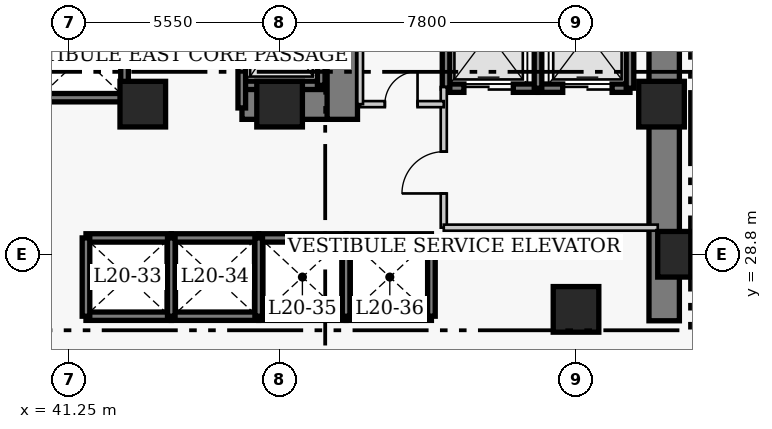
"""IFC4 building model, lengths in metres.
Left out: names, types, materials, properties, quantities, classifications, styles, units other than length and angle.
Written with IfcOpenShell. Run it as: python <this file> out.ifc"""

import sys

from ifc_helpers import new_model, si_unit, direction, frame, frame_2d, origin, origin_2d, place, context, subcontext, project, spatial, rectangle, extrude, element, fill, save


model = new_model("IFC4")
c1 = context("Model", 3, precision=1e-05, world=origin(), true_north=direction((0.0, 1.0)))
c2 = subcontext(c1, "Body", "Model", "MODEL_VIEW")
j1 = project(units=[si_unit("LENGTHUNIT", "METRE"), si_unit("PLANEANGLEUNIT", "RADIAN")], contexts=[c1])
p1 = place(None, origin())
s1 = spatial("IfcSite", under=j1, at=p1, CompositionType="ELEMENT")
p2 = place(p1, origin())
s2 = spatial("IfcBuilding", under=s1, at=p2, CompositionType="ELEMENT")
p3 = place(p2, frame((0.0, 0.0, 84.2)))
s3 = spatial("IfcBuildingStorey", under=s2, at=p3, CompositionType="ELEMENT", Elevation=84.2)
p4 = place(p3, frame((56.92, 27.05, 0.0), z_axis=(0.0, 0.0, 1.0), x_axis=(0.0, 1.0, 0.0)))
e1 = element("IfcWall", 1, at=p4, inside=s3, PredefinedType="SHEAR", context=c2, shape_type="SweptSolid", body=[
    extrude(rectangle(XDim=13.67, YDim=0.8, at=frame_2d((6.835, 0.0))), origin(), (0.0, 0.0, 1.0), 3.8),
])
p5 = place(p3, frame((45.81, 32.75, 0.0), z_axis=(0.0, 0.0, 1.0), x_axis=(1.0, 0.0, 0.0)))
e2 = element("IfcWall", 2, at=p5, inside=s3, PredefinedType="SHEAR", context=c2, shape_type="SweptSolid", body=[
    extrude(rectangle(XDim=2.64, YDim=0.8, at=frame_2d((1.32, 0.0))), origin(), (0.0, 0.0, 1.0), 3.8),
])
p6 = place(p3, frame((48.45, 32.35, 0.0), z_axis=(0.0, 0.0, 1.0), x_axis=(0.0, 1.0, 0.0)))
e3 = element("IfcWall", 3, at=p6, inside=s3, PredefinedType="SHEAR", context=c2, shape_type="SweptSolid", body=[
    extrude(rectangle(XDim=7.97, YDim=0.8, at=frame_2d((3.985, 0.0))), origin(), (0.0, 0.0, 1.0), 3.8),
])
p7 = place(p6, frame((5.85, 0.0, 0.0)))
e4 = element("IfcOpeningElement", 4, at=p7, cuts=e3, PredefinedType="OPENING", context=c2, shape_type="SweptSolid", body=[
    extrude(rectangle(XDim=1.1, YDim=2.15, at=frame_2d((0.55, 1.075))), frame((0.0, 0.41, 0.0), z_axis=(0.0, -1.0, 0.0), x_axis=(1.0, 0.0, 0.0)), (0.0, 0.0, 1.0), 0.82),
])
for number, where, z_axis, x_axis in (
    (5, (57.35, 28.8, 0.0), (0.0, 0.0, 1.0), (1.0, 0.0, 0.0)),
    (6, (43.2, 32.75, 0.0), (0.0, 0.0, 1.0), (1.0, 0.0, 0.0)),
    (7, (46.8, 32.75, 0.0), (0.0, 0.0, 1.0), (1.0, 0.0, 0.0)),
    (8, (54.6, 27.35, 0.0), (0.0, 0.0, 1.0), (1.0, 0.0, 0.0)),
    (9, (56.85, 32.75, 0.0), (0.0, 0.0, 1.0), (1.0, 0.0, 0.0)),
):
    element("IfcColumn", number, at=place(p3, frame(where, z_axis=z_axis, x_axis=x_axis)), inside=s3, PredefinedType="COLUMN", context=c2, shape_type="SweptSolid", body=[
        extrude(rectangle(XDim=1.2, YDim=1.2, at=origin_2d()), origin(), (0.0, 0.0, 1.0), 3.8),
    ])
for number, where, z_axis, x_axis in (
    (10, (41.705, 29.23, 0.0), (0.0, 0.0, 1.0), (1.0, 0.0, 0.0)),
    (11, (41.705, 27.17, 0.0), (0.0, 0.0, 1.0), (1.0, 0.0, 0.0)),
):
    element("IfcWall", number, at=place(p3, frame(where, z_axis=z_axis, x_axis=x_axis)), inside=s3, PredefinedType="SHEAR", context=c2, shape_type="SweptSolid", body=[
        extrude(rectangle(XDim=2.245, YDim=0.22, at=frame_2d((1.123, 0.0))), origin(), (0.0, 0.0, 1.0), 3.8),
    ])
p8 = place(p3, frame((41.705, 27.17, 0.0), z_axis=(0.0, 0.0, 1.0), x_axis=(0.0, 1.0, 0.0)))
e12 = element("IfcWall", 12, at=p8, inside=s3, PredefinedType="SHEAR", context=c2, shape_type="SweptSolid", body=[
    extrude(rectangle(XDim=2.06, YDim=0.2, at=frame_2d((1.03, 0.0))), origin(), (0.0, 0.0, 1.0), 3.8),
])
for number, where, z_axis, x_axis in (
    (13, (43.95, 29.23, 0.0), (0.0, 0.0, 1.0), (1.0, 0.0, 0.0)),
    (14, (43.95, 27.17, 0.0), (0.0, 0.0, 1.0), (1.0, 0.0, 0.0)),
):
    element("IfcWall", number, at=place(p3, frame(where, z_axis=z_axis, x_axis=x_axis)), inside=s3, PredefinedType="SHEAR", context=c2, shape_type="SweptSolid", body=[
        extrude(rectangle(XDim=2.3, YDim=0.22, at=frame_2d((1.15, 0.0))), origin(), (0.0, 0.0, 1.0), 3.8),
    ])
p9 = place(p3, frame((43.95, 27.17, 0.0), z_axis=(0.0, 0.0, 1.0), x_axis=(0.0, 1.0, 0.0)))
e15 = element("IfcWall", 15, at=p9, inside=s3, PredefinedType="SHEAR", context=c2, shape_type="SweptSolid", body=[
    extrude(rectangle(XDim=2.06, YDim=0.2, at=frame_2d((1.03, 0.0))), origin(), (0.0, 0.0, 1.0), 3.8),
])
for number, where, z_axis, x_axis in (
    (16, (46.25, 29.23, 0.0), (0.0, 0.0, 1.0), (1.0, 0.0, 0.0)),
    (17, (46.25, 27.17, 0.0), (0.0, 0.0, 1.0), (1.0, 0.0, 0.0)),
):
    element("IfcWall", number, at=place(p3, frame(where, z_axis=z_axis, x_axis=x_axis)), inside=s3, PredefinedType="SHEAR", context=c2, shape_type="SweptSolid", body=[
        extrude(rectangle(XDim=2.3, YDim=0.22, at=frame_2d((1.15, 0.0))), origin(), (0.0, 0.0, 1.0), 3.8),
    ])
p10 = place(p3, frame((46.25, 27.17, 0.0), z_axis=(0.0, 0.0, 1.0), x_axis=(0.0, 1.0, 0.0)))
e18 = element("IfcWall", 18, at=p10, inside=s3, PredefinedType="SHEAR", context=c2, shape_type="SweptSolid", body=[
    extrude(rectangle(XDim=2.06, YDim=0.2, at=frame_2d((1.03, 0.0))), origin(), (0.0, 0.0, 1.0), 3.8),
])
for number, where, z_axis, x_axis in (
    (19, (48.55, 29.23, 0.0), (0.0, 0.0, 1.0), (1.0, 0.0, 0.0)),
    (20, (48.55, 27.17, 0.0), (0.0, 0.0, 1.0), (1.0, 0.0, 0.0)),
):
    element("IfcWall", number, at=place(p3, frame(where, z_axis=z_axis, x_axis=x_axis)), inside=s3, PredefinedType="SHEAR", context=c2, shape_type="SweptSolid", body=[
        extrude(rectangle(XDim=2.245, YDim=0.22, at=frame_2d((1.123, 0.0))), origin(), (0.0, 0.0, 1.0), 3.8),
    ])
for number, where, z_axis, x_axis in (
    (21, (48.55, 27.17, 0.0), (0.0, 0.0, 1.0), (0.0, 1.0, 0.0)),
    (22, (50.795, 27.17, 0.0), (0.0, 0.0, 1.0), (0.0, 1.0, 0.0)),
):
    element("IfcWall", number, at=place(p3, frame(where, z_axis=z_axis, x_axis=x_axis)), inside=s3, PredefinedType="SHEAR", context=c2, shape_type="SweptSolid", body=[
        extrude(rectangle(XDim=2.06, YDim=0.2, at=frame_2d((1.03, 0.0))), origin(), (0.0, 0.0, 1.0), 3.8),
    ])
p11 = place(p3, frame((40.4, 32.92, 0.0), z_axis=(0.0, 0.0, 1.0), x_axis=(1.0, 0.0, 0.0)))
e23 = element("IfcWall", 23, at=p11, inside=s3, PredefinedType="SHEAR", context=c2, shape_type="SweptSolid", body=[
    extrude(rectangle(XDim=2.32, YDim=0.22, at=frame_2d((1.16, 0.0))), origin(), (0.0, 0.0, 1.0), 3.8),
])
p12 = place(p3, frame((42.72, 32.92, 0.0), z_axis=(0.0, 0.0, 1.0), x_axis=(0.0, 1.0, 0.0)))
e24 = element("IfcWall", 24, at=p12, inside=s3, PredefinedType="SHEAR", context=c2, shape_type="SweptSolid", body=[
    extrude(rectangle(XDim=2.16, YDim=0.2, at=frame_2d((1.08, 0.0))), origin(), (0.0, 0.0, 1.0), 3.8),
])
p13 = place(p3, frame((51.18, 33.17, 0.0), z_axis=(0.0, 0.0, 1.0), x_axis=(1.0, 0.0, 0.0)))
e25 = element("IfcWall", 25, at=p13, inside=s3, PredefinedType="SHEAR", context=c2, shape_type="SweptSolid", body=[
    extrude(rectangle(XDim=2.42, YDim=0.22, at=frame_2d((1.21, 0.0))), origin(), (0.0, 0.0, 1.0), 3.8),
])
p14 = place(p13, frame((0.47, 0.0, 0.0)))
e26 = element("IfcOpeningElement", 26, at=p14, cuts=e25, PredefinedType="OPENING", context=c2, shape_type="SweptSolid", body=[
    extrude(rectangle(XDim=1.3, YDim=2.15, at=frame_2d((0.65, 1.075))), frame((0.0, 0.12, 0.0), z_axis=(0.0, -1.0, 0.0), x_axis=(1.0, 0.0, 0.0)), (0.0, 0.0, 1.0), 0.24),
])
p15 = place(p3, frame((51.18, 33.17, 0.0), z_axis=(0.0, 0.0, 1.0), x_axis=(0.0, 1.0, 0.0)))
e27 = element("IfcWall", 27, at=p15, inside=s3, PredefinedType="SHEAR", context=c2, shape_type="SweptSolid", body=[
    extrude(rectangle(XDim=2.86, YDim=0.2, at=frame_2d((1.43, 0.0))), origin(), (0.0, 0.0, 1.0), 3.8),
])
p16 = place(p3, frame((53.6, 33.17, 0.0), z_axis=(0.0, 0.0, 1.0), x_axis=(1.0, 0.0, 0.0)))
e28 = element("IfcWall", 28, at=p16, inside=s3, PredefinedType="SHEAR", context=c2, shape_type="SweptSolid", body=[
    extrude(rectangle(XDim=2.42, YDim=0.22, at=frame_2d((1.21, 0.0))), origin(), (0.0, 0.0, 1.0), 3.8),
])
p17 = place(p16, frame((0.65, 0.0, 0.0)))
e29 = element("IfcOpeningElement", 29, at=p17, cuts=e28, PredefinedType="OPENING", context=c2, shape_type="SweptSolid", body=[
    extrude(rectangle(XDim=1.3, YDim=2.15, at=frame_2d((0.65, 1.075))), frame((0.0, 0.12, 0.0), z_axis=(0.0, -1.0, 0.0), x_axis=(1.0, 0.0, 0.0)), (0.0, 0.0, 1.0), 0.24),
])
for number, where, z_axis, x_axis in (
    (30, (53.6, 33.17, 0.0), (0.0, 0.0, 1.0), (0.0, 1.0, 0.0)),
    (31, (56.02, 33.17, 0.0), (0.0, 0.0, 1.0), (0.0, 1.0, 0.0)),
):
    element("IfcWall", number, at=place(p3, frame(where, z_axis=z_axis, x_axis=x_axis)), inside=s3, PredefinedType="SHEAR", context=c2, shape_type="SweptSolid", body=[
        extrude(rectangle(XDim=2.86, YDim=0.2, at=frame_2d((1.43, 0.0))), origin(), (0.0, 0.0, 1.0), 3.8),
    ])
p18 = place(p3, frame((45.805, 33.245, 0.0), z_axis=(0.0, 0.0, 1.0), x_axis=(1.0, 0.0, 0.0)))
e32 = element("IfcWall", 32, at=p18, inside=s3, PredefinedType="SHEAR", context=c2, shape_type="SweptSolid", body=[
    extrude(rectangle(XDim=2.09, YDim=0.22, at=frame_2d((1.045, 0.0))), origin(), (0.0, 0.0, 1.0), 3.8),
])
p19 = place(p3, frame((45.805, 32.65, 0.0), z_axis=(0.0, 0.0, 1.0), x_axis=(0.0, 1.0, 0.0)))
e33 = element("IfcWall", 33, at=p19, inside=s3, PredefinedType="SHEAR", context=c2, shape_type="SweptSolid", body=[
    extrude(rectangle(XDim=3.505, YDim=0.2, at=frame_2d((1.752, 0.0))), origin(), (0.0, 0.0, 1.0), 3.8),
])
p20 = place(p3, frame((47.895, 33.245, 0.0), z_axis=(0.0, 0.0, 1.0), x_axis=(0.0, 1.0, 0.0)))
e34 = element("IfcWall", 34, at=p20, inside=s3, PredefinedType="SHEAR", context=c2, shape_type="SweptSolid", body=[
    extrude(rectangle(XDim=2.91, YDim=0.2, at=frame_2d((1.455, 0.0))), origin(), (0.0, 0.0, 1.0), 3.8),
])
p21 = place(p3, frame((51.12, 29.5, 0.0), z_axis=(0.0, 0.0, 1.0), x_axis=(0.0, 1.0, 0.0)))
e35 = element("IfcWall", 35, at=p21, inside=s3, PredefinedType="PARTITIONING", context=c2, shape_type="SweptSolid", body=[
    extrude(rectangle(XDim=3.7, YDim=0.16, at=frame_2d((1.85, 0.0))), origin(), (0.0, 0.0, 1.0), 3.54),
])
p22 = place(p21, frame((0.9, 0.0, 0.0)))
e36 = element("IfcOpeningElement", 36, at=p22, cuts=e35, PredefinedType="OPENING", context=c2, shape_type="SweptSolid", body=[
    extrude(rectangle(XDim=1.1, YDim=2.15, at=frame_2d((0.55, 1.075))), frame((0.0, 0.09, 0.0), z_axis=(0.0, -1.0, 0.0), x_axis=(1.0, 0.0, 0.0)), (0.0, 0.0, 1.0), 0.18),
])
p23 = place(p3, frame((51.12, 29.5, 0.0), z_axis=(0.0, 0.0, 1.0), x_axis=(1.0, 0.0, 0.0)))
e37 = element("IfcWall", 37, at=p23, inside=s3, PredefinedType="PARTITIONING", context=c2, shape_type="SweptSolid", body=[
    extrude(rectangle(XDim=5.63, YDim=0.16, at=frame_2d((2.815, 0.0))), origin(), (0.0, 0.0, 1.0), 3.54),
])
p24 = place(p3, frame((48.92, 32.75, 0.0), z_axis=(0.0, 0.0, 1.0), x_axis=(1.0, 0.0, 0.0)))
e38 = element("IfcWall", 38, at=p24, inside=s3, PredefinedType="PARTITIONING", context=c2, shape_type="SweptSolid", body=[
    extrude(rectangle(XDim=2.2, YDim=0.16, at=frame_2d((1.1, 0.0))), origin(), (0.0, 0.0, 1.0), 3.54),
])
p25 = place(p24, frame((0.65, 0.0, 0.0)))
e39 = element("IfcOpeningElement", 39, at=p25, cuts=e38, PredefinedType="OPENING", context=c2, shape_type="SweptSolid", body=[
    extrude(rectangle(XDim=0.86, YDim=2.05, at=frame_2d((0.43, 1.025))), frame((0.0, 0.09, 0.0), z_axis=(0.0, -1.0, 0.0), x_axis=(1.0, 0.0, 0.0)), (0.0, 0.0, 1.0), 0.18),
])
p26 = place(p3, frame((48.92, 32.75, 0.0), z_axis=(0.0, 0.0, 1.0), x_axis=(0.0, 1.0, 0.0)))
e40 = element("IfcWall", 40, at=p26, inside=s3, PredefinedType="PARTITIONING", context=c2, shape_type="SweptSolid", body=[
    extrude(rectangle(XDim=3.62, YDim=0.15, at=frame_2d((1.81, 0.0))), origin(), (0.0, 0.0, 1.0), 3.54),
])
p27 = place(p14, origin())
e41 = element("IfcDoor", 41, at=p27, inside=s3, OperationType="DOUBLE_DOOR_SLIDING", PredefinedType="DOOR", context=c2, shape_type="SweptSolid", body=[
    extrude(rectangle(XDim=1.3, YDim=2.15, at=frame_2d((0.65, 1.075))), frame((0.0, 0.025, 0.0), z_axis=(0.0, -1.0, 0.0), x_axis=(1.0, 0.0, 0.0)), (0.0, 0.0, 1.0), 0.05),
])
fill(e26, e41)
p28 = place(p17, origin())
e42 = element("IfcDoor", 42, at=p28, inside=s3, OperationType="DOUBLE_DOOR_SLIDING", PredefinedType="DOOR", context=c2, shape_type="SweptSolid", body=[
    extrude(rectangle(XDim=1.3, YDim=2.15, at=frame_2d((0.65, 1.075))), frame((0.0, 0.025, 0.0), z_axis=(0.0, -1.0, 0.0), x_axis=(1.0, 0.0, 0.0)), (0.0, 0.0, 1.0), 0.05),
])
fill(e29, e42)
p29 = place(p22, origin())
e43 = element("IfcDoor", 43, at=p29, inside=s3, OperationType="SINGLE_SWING_LEFT", PredefinedType="DOOR", context=c2, shape_type="SweptSolid", body=[
    extrude(rectangle(XDim=1.1, YDim=2.15, at=frame_2d((0.55, 1.075))), frame((0.0, 0.025, 0.0), z_axis=(0.0, -1.0, 0.0), x_axis=(1.0, 0.0, 0.0)), (0.0, 0.0, 1.0), 0.05),
])
fill(e36, e43)
p30 = place(p25, origin())
e44 = element("IfcDoor", 44, at=p30, inside=s3, OperationType="SINGLE_SWING_RIGHT", PredefinedType="DOOR", context=c2, shape_type="SweptSolid", body=[
    extrude(rectangle(XDim=0.86, YDim=2.05, at=frame_2d((0.43, 1.025))), frame((0.0, 0.025, 0.0), z_axis=(0.0, -1.0, 0.0), x_axis=(1.0, 0.0, 0.0)), (0.0, 0.0, 1.0), 0.05),
])
fill(e39, e44)
save(model, sys.argv[1])
